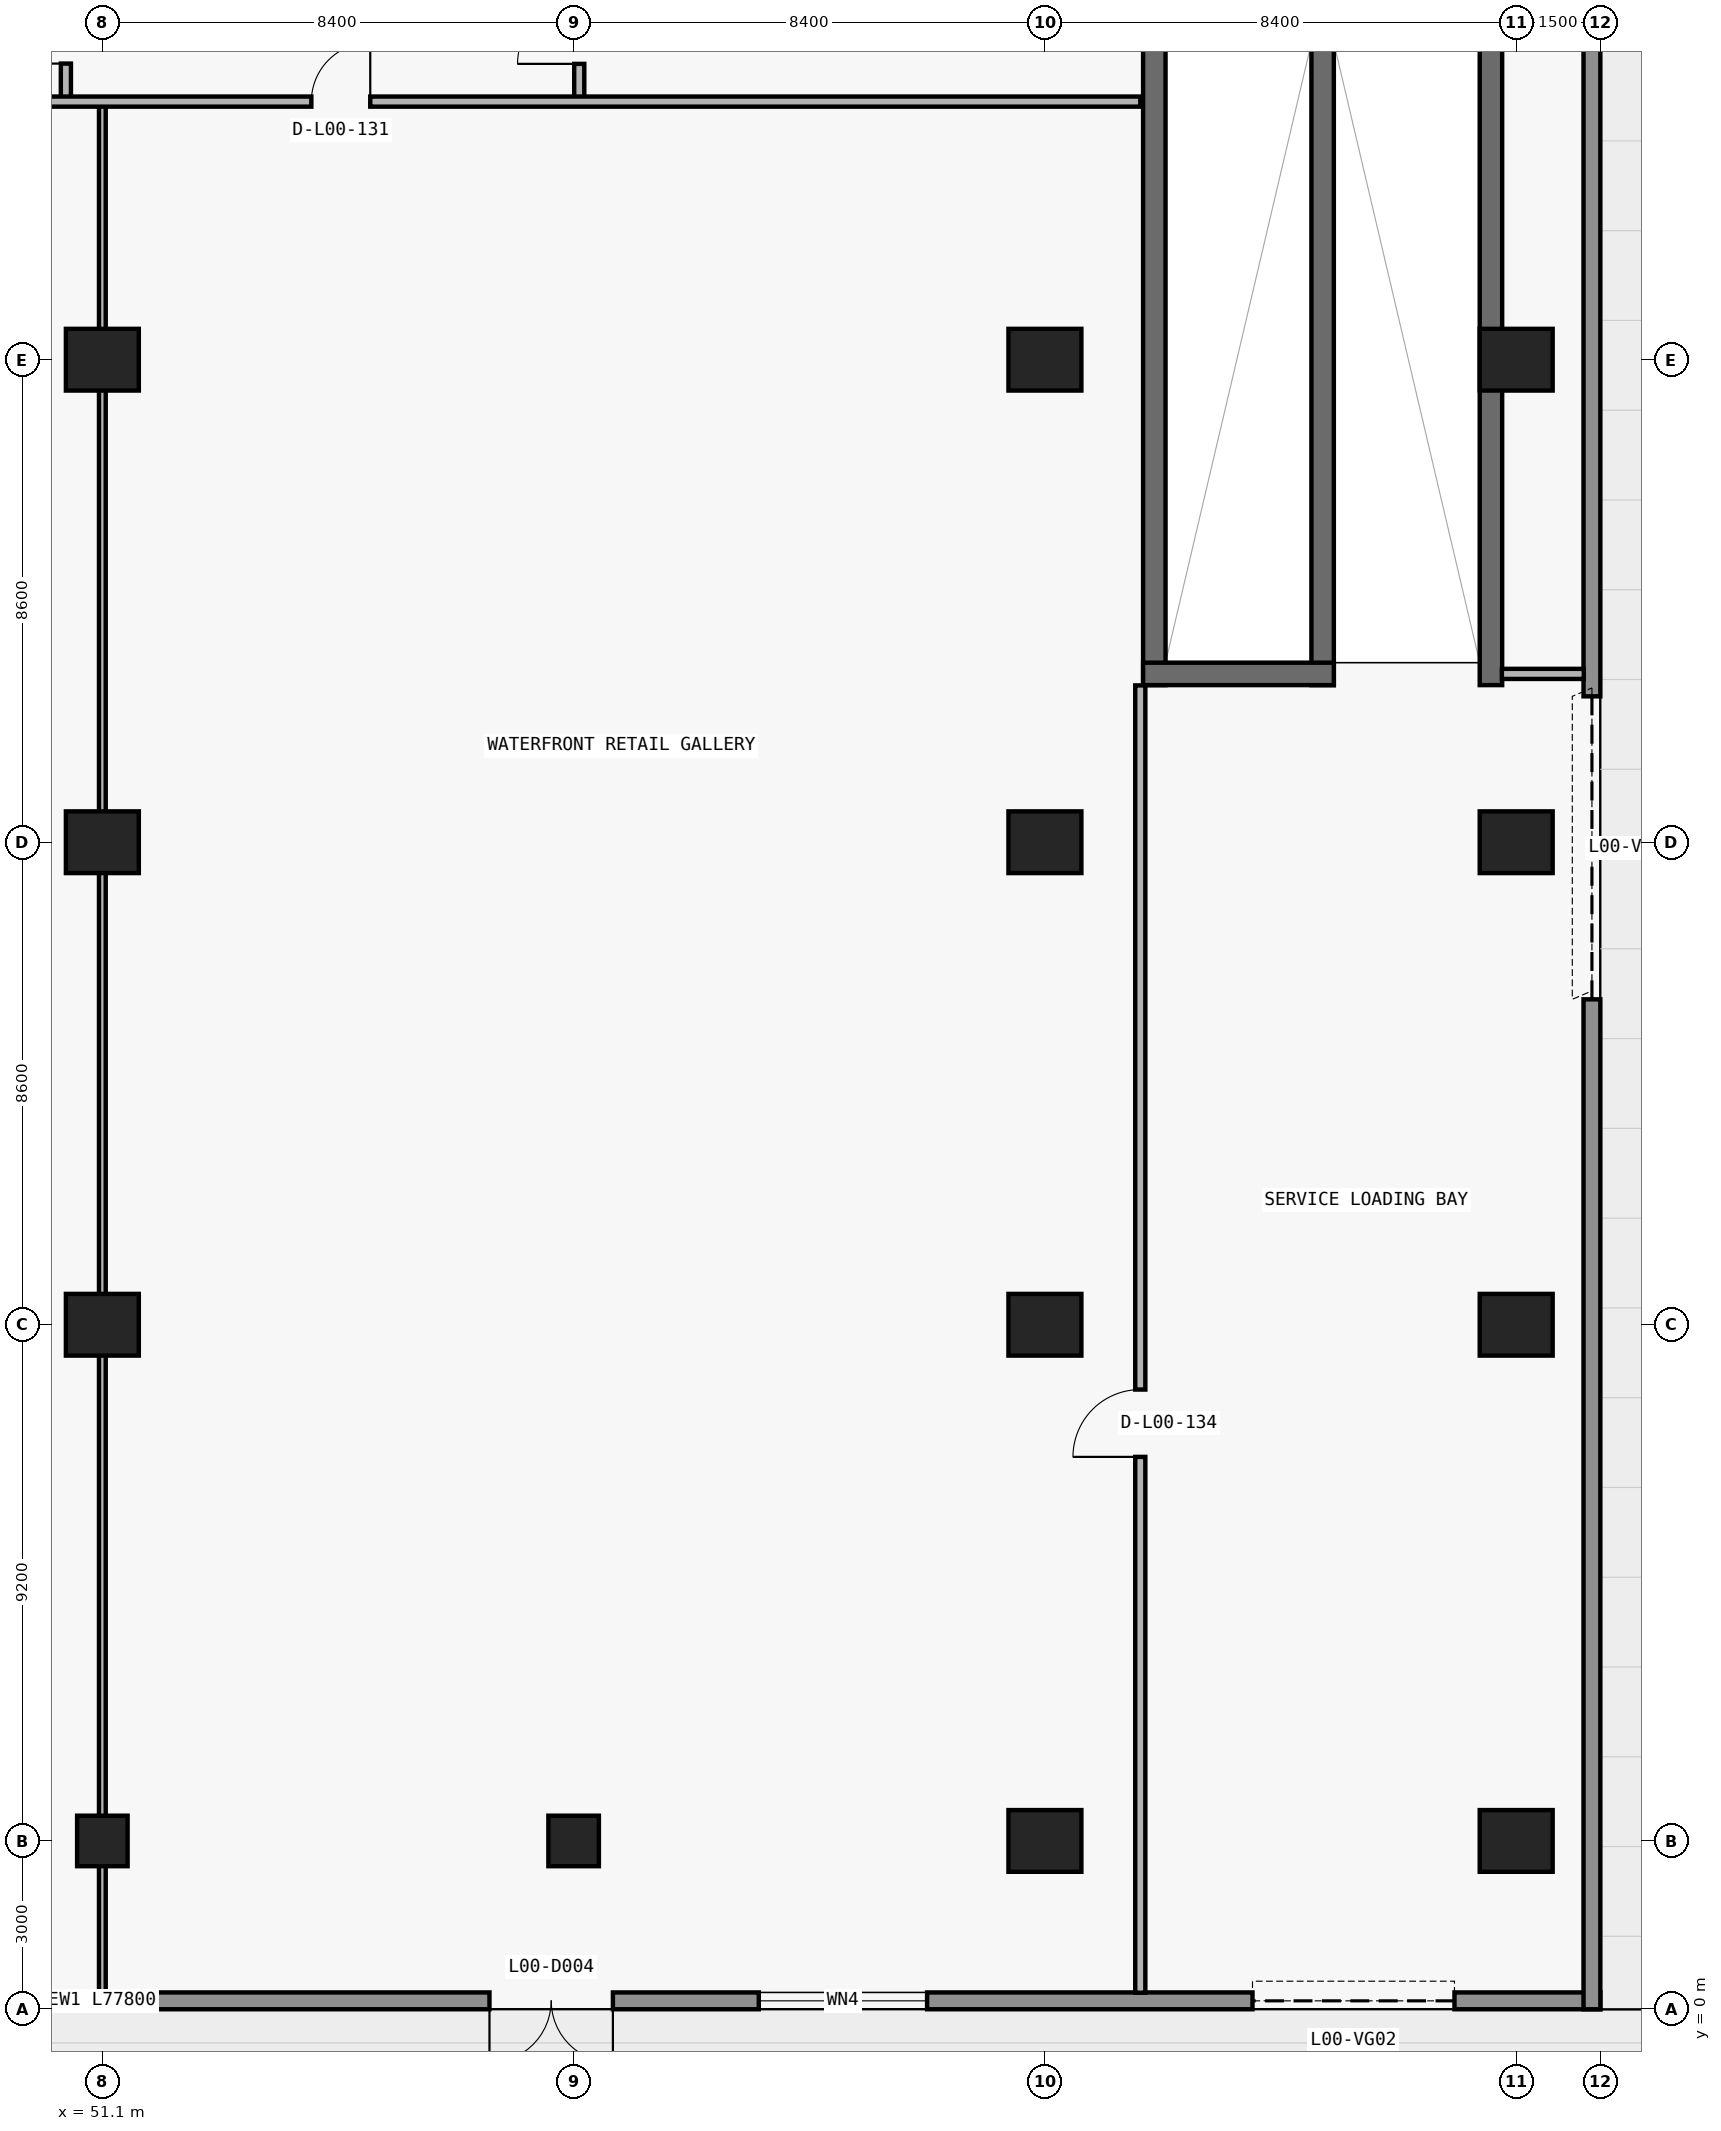
"""IFC4 building model, lengths in metres.
Left out: names, types, materials, properties, quantities, classifications, styles, units other than length and angle.
Written with IfcOpenShell. Run it as: python <this file> out.ifc"""

import sys

from ifc_helpers import new_model, si_unit, direction, frame, frame_2d, origin, origin_2d, place, context, subcontext, project, spatial, rectangle, circle, extrude, element, fill, save


model = new_model("IFC4")
c1 = context("Model", 3, precision=1e-05, world=origin(), true_north=direction((0.0, 1.0)))
c2 = subcontext(c1, "Body", "Model", "MODEL_VIEW")
j1 = project(units=[si_unit("LENGTHUNIT", "METRE"), si_unit("PLANEANGLEUNIT", "RADIAN")], contexts=[c1])
p1 = place(None, origin())
s1 = spatial("IfcSite", under=j1, at=p1, CompositionType="ELEMENT")
p2 = place(p1, origin())
s2 = spatial("IfcBuilding", under=s1, at=p2, CompositionType="ELEMENT")
p3 = place(p2, origin())
s3 = spatial("IfcBuildingStorey", under=s2, at=p3, CompositionType="ELEMENT", Elevation=0.0)
for number, where, z_axis, x_axis in (
    (1, (69.85, 23.6, 0.0), (0.0, 0.0, 1.0), (0.0, 1.0, 0.0)),
    (2, (75.85, 23.6, 0.0), (0.0, 0.0, 1.0), (0.0, 1.0, 0.0)),
):
    element("IfcWall", number, at=place(p3, frame(where, z_axis=z_axis, x_axis=x_axis)), inside=s3, PredefinedType="SHEAR", context=c2, shape_type="SweptSolid", body=[
        extrude(rectangle(XDim=24.2, YDim=0.4, at=frame_2d((12.1, 0.0))), origin(), (0.0, 0.0, 1.0), 5.1),
    ])
p4 = place(p3, frame((72.85, 23.6, -0.3), z_axis=(0.0, 0.0, 1.0), x_axis=(0.0, 1.0, 0.0)))
e3 = element("IfcWall", 3, at=p4, inside=s3, PredefinedType="SHEAR", context=c2, shape_type="SweptSolid", body=[
    extrude(rectangle(XDim=18.4, YDim=0.4, at=frame_2d((9.2, 0.0))), origin(), (0.0, 0.0, 1.0), 5.4),
])
p5 = place(p3, frame((69.65, 23.8, 0.0), z_axis=(0.0, 0.0, 1.0), x_axis=(1.0, 0.0, 0.0)))
e4 = element("IfcWall", 4, at=p5, inside=s3, PredefinedType="SHEAR", context=c2, shape_type="SweptSolid", body=[
    extrude(rectangle(XDim=3.4, YDim=0.4, at=frame_2d((1.7, 0.0))), origin(), (0.0, 0.0, 1.0), 5.1),
])
for number, where, z_axis, x_axis in (
    (5, (51.1, 3.0, 0.0), (0.0, 0.0, 1.0), (1.0, 0.0, 0.0)),
    (6, (59.5, 3.0, 0.0), (0.0, 0.0, 1.0), (1.0, 0.0, 0.0)),
):
    element("IfcColumn", number, at=place(p3, frame(where, z_axis=z_axis, x_axis=x_axis)), inside=s3, PredefinedType="COLUMN", context=c2, shape_type="SweptSolid", body=[
        extrude(circle(Radius=0.45, at=origin_2d()), origin(), (0.0, 0.0, 1.0), 5.1),
    ])
for number, where, z_axis, x_axis in (
    (7, (67.9, 3.0, 0.0), (0.0, 0.0, 1.0), (1.0, 0.0, 0.0)),
    (8, (76.3, 3.0, 0.0), (0.0, 0.0, 1.0), (1.0, 0.0, 0.0)),
    (9, (51.1, 12.2, 0.0), (0.0, 0.0, 1.0), (1.0, 0.0, 0.0)),
    (10, (67.9, 12.2, 0.0), (0.0, 0.0, 1.0), (1.0, 0.0, 0.0)),
    (11, (76.3, 12.2, 0.0), (0.0, 0.0, 1.0), (1.0, 0.0, 0.0)),
    (12, (51.1, 20.8, 0.0), (0.0, 0.0, 1.0), (1.0, 0.0, 0.0)),
    (13, (67.9, 20.8, 0.0), (0.0, 0.0, 1.0), (1.0, 0.0, 0.0)),
    (14, (76.3, 20.8, 0.0), (0.0, 0.0, 1.0), (1.0, 0.0, 0.0)),
    (15, (51.1, 29.4, 0.0), (0.0, 0.0, 1.0), (1.0, 0.0, 0.0)),
    (16, (67.9, 29.4, 0.0), (0.0, 0.0, 1.0), (1.0, 0.0, 0.0)),
    (17, (76.3, 29.4, 0.0), (0.0, 0.0, 1.0), (1.0, 0.0, 0.0)),
):
    element("IfcColumn", number, at=place(p3, frame(where, z_axis=z_axis, x_axis=x_axis)), inside=s3, PredefinedType="COLUMN", context=c2, shape_type="SweptSolid", body=[
        extrude(rectangle(XDim=1.3, YDim=1.1, at=origin_2d()), origin(), (0.0, 0.0, 1.0), 5.1),
    ])
p6 = place(p3, frame((77.8, 0.15, 0.0), z_axis=(0.0, 0.0, 1.0), x_axis=(-1.0, 0.0, 0.0)))
e18 = element("IfcWall", 18, at=p6, inside=s3, PredefinedType="STANDARD", context=c2, shape_type="SweptSolid", body=[
    extrude(rectangle(XDim=77.8, YDim=0.3, at=frame_2d((38.9, 0.0))), origin(), (0.0, 0.0, 1.0), 5.1),
])
p7 = place(p6, frame((2.6, 0.0, 0.0)))
e19 = element("IfcOpeningElement", 19, at=p7, cuts=e18, PredefinedType="OPENING", context=c2, shape_type="SweptSolid", body=[
    extrude(rectangle(XDim=3.6, YDim=3.8, at=frame_2d((1.8, 1.9))), frame((0.0, 0.16, 0.0), z_axis=(0.0, -1.0, 0.0), x_axis=(1.0, 0.0, 0.0)), (0.0, 0.0, 1.0), 0.32),
])
p8 = place(p6, frame((17.6, 0.0, 0.0)))
e20 = element("IfcOpeningElement", 20, at=p8, cuts=e18, PredefinedType="OPENING", context=c2, shape_type="SweptSolid", body=[
    extrude(rectangle(XDim=2.2, YDim=2.6, at=frame_2d((1.1, 1.3))), frame((0.0, 0.16, 0.0), z_axis=(0.0, -1.0, 0.0), x_axis=(1.0, 0.0, 0.0)), (0.0, 0.0, 1.0), 0.32),
])
p9 = place(p6, frame((12.0, 0.0, 0.6)))
e21 = element("IfcOpeningElement", 21, at=p9, cuts=e18, PredefinedType="OPENING", context=c2, shape_type="SweptSolid", body=[
    extrude(rectangle(XDim=3.0, YDim=2.4, at=frame_2d((1.5, 1.2))), frame((0.0, 0.16, 0.0), z_axis=(0.0, -1.0, 0.0), x_axis=(1.0, 0.0, 0.0)), (0.0, 0.0, 1.0), 0.32),
])
p10 = place(p6, frame((33.6, 0.0, 0.0)))
e22 = element("IfcOpeningElement", 22, at=p10, cuts=e18, PredefinedType="OPENING", context=c2, shape_type="SweptSolid", body=[
    extrude(rectangle(XDim=2.2, YDim=2.6, at=frame_2d((1.1, 1.3))), frame((0.0, 0.16, 0.0), z_axis=(0.0, -1.0, 0.0), x_axis=(1.0, 0.0, 0.0)), (0.0, 0.0, 1.0), 0.32),
])
p11 = place(p6, frame((42.0, 0.0, 0.0)))
e23 = element("IfcOpeningElement", 23, at=p11, cuts=e18, PredefinedType="OPENING", context=c2, shape_type="SweptSolid", body=[
    extrude(rectangle(XDim=2.2, YDim=2.6, at=frame_2d((1.1, 1.3))), frame((0.0, 0.16, 0.0), z_axis=(0.0, -1.0, 0.0), x_axis=(1.0, 0.0, 0.0)), (0.0, 0.0, 1.0), 0.32),
])
p12 = place(p6, frame((37.4, 0.0, 0.6)))
e24 = element("IfcOpeningElement", 24, at=p12, cuts=e18, PredefinedType="OPENING", context=c2, shape_type="SweptSolid", body=[
    extrude(rectangle(XDim=3.0, YDim=2.4, at=frame_2d((1.5, 1.2))), frame((0.0, 0.16, 0.0), z_axis=(0.0, -1.0, 0.0), x_axis=(1.0, 0.0, 0.0)), (0.0, 0.0, 1.0), 0.32),
])
p13 = place(p6, frame((63.6, 0.0, 0.0)))
e25 = element("IfcOpeningElement", 25, at=p13, cuts=e18, PredefinedType="OPENING", context=c2, shape_type="SweptSolid", body=[
    extrude(rectangle(XDim=2.2, YDim=2.6, at=frame_2d((1.1, 1.3))), frame((0.0, 0.16, 0.0), z_axis=(0.0, -1.0, 0.0), x_axis=(1.0, 0.0, 0.0)), (0.0, 0.0, 1.0), 0.32),
])
p14 = place(p6, frame((56.0, 0.0, 0.6)))
e26 = element("IfcOpeningElement", 26, at=p14, cuts=e18, PredefinedType="OPENING", context=c2, shape_type="SweptSolid", body=[
    extrude(rectangle(XDim=3.0, YDim=2.4, at=frame_2d((1.5, 1.2))), frame((0.0, 0.16, 0.0), z_axis=(0.0, -1.0, 0.0), x_axis=(1.0, 0.0, 0.0)), (0.0, 0.0, 1.0), 0.32),
])
p15 = place(p3, frame((77.65, 53.8, 0.0), z_axis=(0.0, 0.0, 1.0), x_axis=(0.0, -1.0, 0.0)))
e27 = element("IfcWall", 27, at=p15, inside=s3, PredefinedType="STANDARD", context=c2, shape_type="SweptSolid", body=[
    extrude(rectangle(XDim=53.8, YDim=0.3, at=frame_2d((26.9, 0.0))), origin(), (0.0, 0.0, 1.0), 5.1),
])
p16 = place(p15, frame((3.8, 0.0, 0.0)))
e28 = element("IfcOpeningElement", 28, at=p16, cuts=e27, PredefinedType="OPENING", context=c2, shape_type="SweptSolid", body=[
    extrude(rectangle(XDim=1.4, YDim=2.2, at=frame_2d((0.7, 1.1))), frame((0.0, 0.16, 0.0), z_axis=(0.0, -1.0, 0.0), x_axis=(1.0, 0.0, 0.0)), (0.0, 0.0, 1.0), 0.32),
])
p17 = place(p15, frame((1.2, 0.0, 0.0)))
e29 = element("IfcOpeningElement", 29, at=p17, cuts=e27, PredefinedType="OPENING", context=c2, shape_type="SweptSolid", body=[
    extrude(rectangle(XDim=1.4, YDim=2.2, at=frame_2d((0.7, 1.1))), frame((0.0, 0.16, 0.0), z_axis=(0.0, -1.0, 0.0), x_axis=(1.0, 0.0, 0.0)), (0.0, 0.0, 1.0), 0.32),
])
p18 = place(p15, frame((30.4, 0.0, 0.0)))
e30 = element("IfcOpeningElement", 30, at=p18, cuts=e27, PredefinedType="OPENING", context=c2, shape_type="SweptSolid", body=[
    extrude(rectangle(XDim=5.4, YDim=3.2, at=frame_2d((2.7, 1.6))), frame((0.0, 0.16, 0.0), z_axis=(0.0, -1.0, 0.0), x_axis=(1.0, 0.0, 0.0)), (0.0, 0.0, 1.0), 0.32),
])
p19 = place(p3, frame((50.45, 34.0, 0.0), z_axis=(0.0, 0.0, 1.0), x_axis=(0.0, 1.0, 0.0)))
e31 = element("IfcWall", 31, at=p19, inside=s3, PredefinedType="PARTITIONING", context=c2, shape_type="SweptSolid", body=[
    extrude(rectangle(XDim=2.455, YDim=0.18, at=frame_2d((1.228, 0.0))), origin(), (0.0, 0.0, 1.0), 5.1),
])
p20 = place(p19, frame((0.677, 0.0, 0.0)))
e32 = element("IfcOpeningElement", 32, at=p20, cuts=e31, PredefinedType="OPENING", context=c2, shape_type="SweptSolid", body=[
    extrude(rectangle(XDim=1.1, YDim=2.15, at=frame_2d((0.55, 1.075))), frame((0.0, 0.1, 0.0), z_axis=(0.0, -1.0, 0.0), x_axis=(1.0, 0.0, 0.0)), (0.0, 0.0, 1.0), 0.2),
])
p21 = place(p3, frame((51.1, 0.295, 0.0), z_axis=(0.0, 0.0, 1.0), x_axis=(0.0, 1.0, 0.0)))
e33 = element("IfcWall", 33, at=p21, inside=s3, PredefinedType="PARTITIONING", context=c2, shape_type="SweptSolid", body=[
    extrude(rectangle(XDim=33.705, YDim=0.12, at=frame_2d((16.853, 0.0))), origin(), (0.0, 0.0, 1.0), 4.064),
])
p22 = place(p3, frame((59.6, 34.0, 0.0), z_axis=(0.0, 0.0, 1.0), x_axis=(0.0, 1.0, 0.0)))
e34 = element("IfcWall", 34, at=p22, inside=s3, PredefinedType="PARTITIONING", context=c2, shape_type="SweptSolid", body=[
    extrude(rectangle(XDim=2.445, YDim=0.18, at=frame_2d((1.223, 0.0))), origin(), (0.0, 0.0, 1.0), 5.1),
])
p23 = place(p22, frame((0.673, 0.0, 0.0)))
e35 = element("IfcOpeningElement", 35, at=p23, cuts=e34, PredefinedType="OPENING", context=c2, shape_type="SweptSolid", body=[
    extrude(rectangle(XDim=1.1, YDim=2.15, at=frame_2d((0.55, 1.075))), frame((0.0, 0.1, 0.0), z_axis=(0.0, -1.0, 0.0), x_axis=(1.0, 0.0, 0.0)), (0.0, 0.0, 1.0), 0.2),
])
p24 = place(p3, frame((69.6, 0.295, 0.0), z_axis=(0.0, 0.0, 1.0), x_axis=(0.0, 1.0, 0.0)))
e36 = element("IfcWall", 36, at=p24, inside=s3, PredefinedType="PARTITIONING", context=c2, shape_type="SweptSolid", body=[
    extrude(rectangle(XDim=23.3, YDim=0.18, at=frame_2d((11.65, 0.0))), origin(), (0.0, 0.0, 1.0), 5.1),
])
p25 = place(p24, frame((9.55, 0.0, 0.0)))
e37 = element("IfcOpeningElement", 37, at=p25, cuts=e36, PredefinedType="OPENING", context=c2, shape_type="SweptSolid", body=[
    extrude(rectangle(XDim=1.2, YDim=2.2, at=frame_2d((0.6, 1.1))), frame((0.0, 0.1, 0.0), z_axis=(0.0, -1.0, 0.0), x_axis=(1.0, 0.0, 0.0)), (0.0, 0.0, 1.0), 0.2),
])
p26 = place(p3, frame((76.045, 23.8, 0.0), z_axis=(0.0, 0.0, 1.0), x_axis=(1.0, 0.0, 0.0)))
e38 = element("IfcWall", 38, at=p26, inside=s3, PredefinedType="PARTITIONING", context=c2, shape_type="SweptSolid", body=[
    extrude(rectangle(XDim=1.46, YDim=0.18, at=frame_2d((0.73, 0.0))), origin(), (0.0, 0.0, 1.0), 5.1),
])
p27 = place(p3, frame((0.295, 34.0, 0.0), z_axis=(0.0, 0.0, 1.0), x_axis=(1.0, 0.0, 0.0)))
e39 = element("IfcWall", 39, at=p27, inside=s3, PredefinedType="PARTITIONING", context=c2, shape_type="SweptSolid", body=[
    extrude(rectangle(XDim=69.305, YDim=0.18, at=frame_2d((34.653, 0.0))), origin(), (0.0, 0.0, 1.0), 5.1),
])
p28 = place(p27, frame((38.13, 0.0, 0.0)))
e40 = element("IfcOpeningElement", 40, at=p28, cuts=e39, PredefinedType="OPENING", context=c2, shape_type="SweptSolid", body=[
    extrude(rectangle(XDim=1.05, YDim=2.15, at=frame_2d((0.525, 1.075))), frame((0.0, 0.1, 0.0), z_axis=(0.0, -1.0, 0.0), x_axis=(1.0, 0.0, 0.0)), (0.0, 0.0, 1.0), 0.2),
])
p29 = place(p27, frame((12.752, 0.0, 0.0)))
e41 = element("IfcOpeningElement", 41, at=p29, cuts=e39, PredefinedType="OPENING", context=c2, shape_type="SweptSolid", body=[
    extrude(rectangle(XDim=0.9, YDim=2.15, at=frame_2d((0.45, 1.075))), frame((0.0, 0.1, 0.0), z_axis=(0.0, -1.0, 0.0), x_axis=(1.0, 0.0, 0.0)), (0.0, 0.0, 1.0), 0.2),
])
p30 = place(p27, frame((54.53, 0.0, 0.0)))
e42 = element("IfcOpeningElement", 42, at=p30, cuts=e39, PredefinedType="OPENING", context=c2, shape_type="SweptSolid", body=[
    extrude(rectangle(XDim=1.05, YDim=2.15, at=frame_2d((0.525, 1.075))), frame((0.0, 0.1, 0.0), z_axis=(0.0, -1.0, 0.0), x_axis=(1.0, 0.0, 0.0)), (0.0, 0.0, 1.0), 0.2),
])
p31 = place(p7, origin())
e43 = element("IfcDoor", 43, at=p31, inside=s3, OperationType="ROLLINGUP", PredefinedType="GATE", context=c2, shape_type="SweptSolid", body=[
    extrude(rectangle(XDim=3.6, YDim=3.8, at=frame_2d((1.8, 1.9))), frame((0.0, 0.025, 0.0), z_axis=(0.0, -1.0, 0.0), x_axis=(1.0, 0.0, 0.0)), (0.0, 0.0, 1.0), 0.05),
])
fill(e19, e43)
p32 = place(p8, origin())
e44 = element("IfcDoor", 44, at=p32, inside=s3, OperationType="DOUBLE_DOOR_SINGLE_SWING", PredefinedType="DOOR", context=c2, shape_type="SweptSolid", body=[
    extrude(rectangle(XDim=2.2, YDim=2.6, at=frame_2d((1.1, 1.3))), frame((0.0, 0.025, 0.0), z_axis=(0.0, -1.0, 0.0), x_axis=(1.0, 0.0, 0.0)), (0.0, 0.0, 1.0), 0.05),
])
fill(e20, e44)
p33 = place(p9, origin())
e45 = element("IfcWindow", 45, at=p33, inside=s3, PartitioningType="SINGLE_PANEL", PredefinedType="WINDOW", context=c2, shape_type="SweptSolid", body=[
    extrude(rectangle(XDim=3.0, YDim=2.4, at=frame_2d((1.5, 1.2))), frame((0.0, 0.03, 0.0), z_axis=(0.0, -1.0, 0.0), x_axis=(1.0, 0.0, 0.0)), (0.0, 0.0, 1.0), 0.06),
])
fill(e21, e45)
p34 = place(p18, origin())
e46 = element("IfcDoor", 46, at=p34, inside=s3, OperationType="ROLLINGUP", PredefinedType="GATE", context=c2, shape_type="SweptSolid", body=[
    extrude(rectangle(XDim=5.4, YDim=3.2, at=frame_2d((2.7, 1.6))), frame((0.0, 0.025, 0.0), z_axis=(0.0, -1.0, 0.0), x_axis=(1.0, 0.0, 0.0)), (0.0, 0.0, 1.0), 0.05),
])
fill(e30, e46)
p35 = place(p20, origin())
e47 = element("IfcDoor", 47, at=p35, inside=s3, OperationType="SINGLE_SWING_LEFT", PredefinedType="DOOR", context=c2, shape_type="SweptSolid", body=[
    extrude(rectangle(XDim=1.1, YDim=2.15, at=frame_2d((0.55, 1.075))), frame((0.0, 0.025, 0.0), z_axis=(0.0, -1.0, 0.0), x_axis=(1.0, 0.0, 0.0)), (0.0, 0.0, 1.0), 0.05),
])
fill(e32, e47)
p36 = place(p30, origin())
e48 = element("IfcDoor", 48, at=p36, inside=s3, OperationType="SINGLE_SWING_RIGHT", PredefinedType="DOOR", context=c2, shape_type="SweptSolid", body=[
    extrude(rectangle(XDim=1.05, YDim=2.15, at=frame_2d((0.525, 1.075))), frame((0.0, 0.025, 0.0), z_axis=(0.0, -1.0, 0.0), x_axis=(1.0, 0.0, 0.0)), (0.0, 0.0, 1.0), 0.05),
])
fill(e42, e48)
p37 = place(p23, origin())
e49 = element("IfcDoor", 49, at=p37, inside=s3, OperationType="SINGLE_SWING_LEFT", PredefinedType="DOOR", context=c2, shape_type="SweptSolid", body=[
    extrude(rectangle(XDim=1.1, YDim=2.15, at=frame_2d((0.55, 1.075))), frame((0.0, 0.025, 0.0), z_axis=(0.0, -1.0, 0.0), x_axis=(1.0, 0.0, 0.0)), (0.0, 0.0, 1.0), 0.05),
])
fill(e35, e49)
p38 = place(p25, origin())
e50 = element("IfcDoor", 50, at=p38, inside=s3, OperationType="SINGLE_SWING_LEFT", PredefinedType="DOOR", context=c2, shape_type="SweptSolid", body=[
    extrude(rectangle(XDim=1.2, YDim=2.2, at=frame_2d((0.6, 1.1))), frame((0.0, 0.025, 0.0), z_axis=(0.0, -1.0, 0.0), x_axis=(1.0, 0.0, 0.0)), (0.0, 0.0, 1.0), 0.05),
])
fill(e37, e50)
save(model, sys.argv[1])
